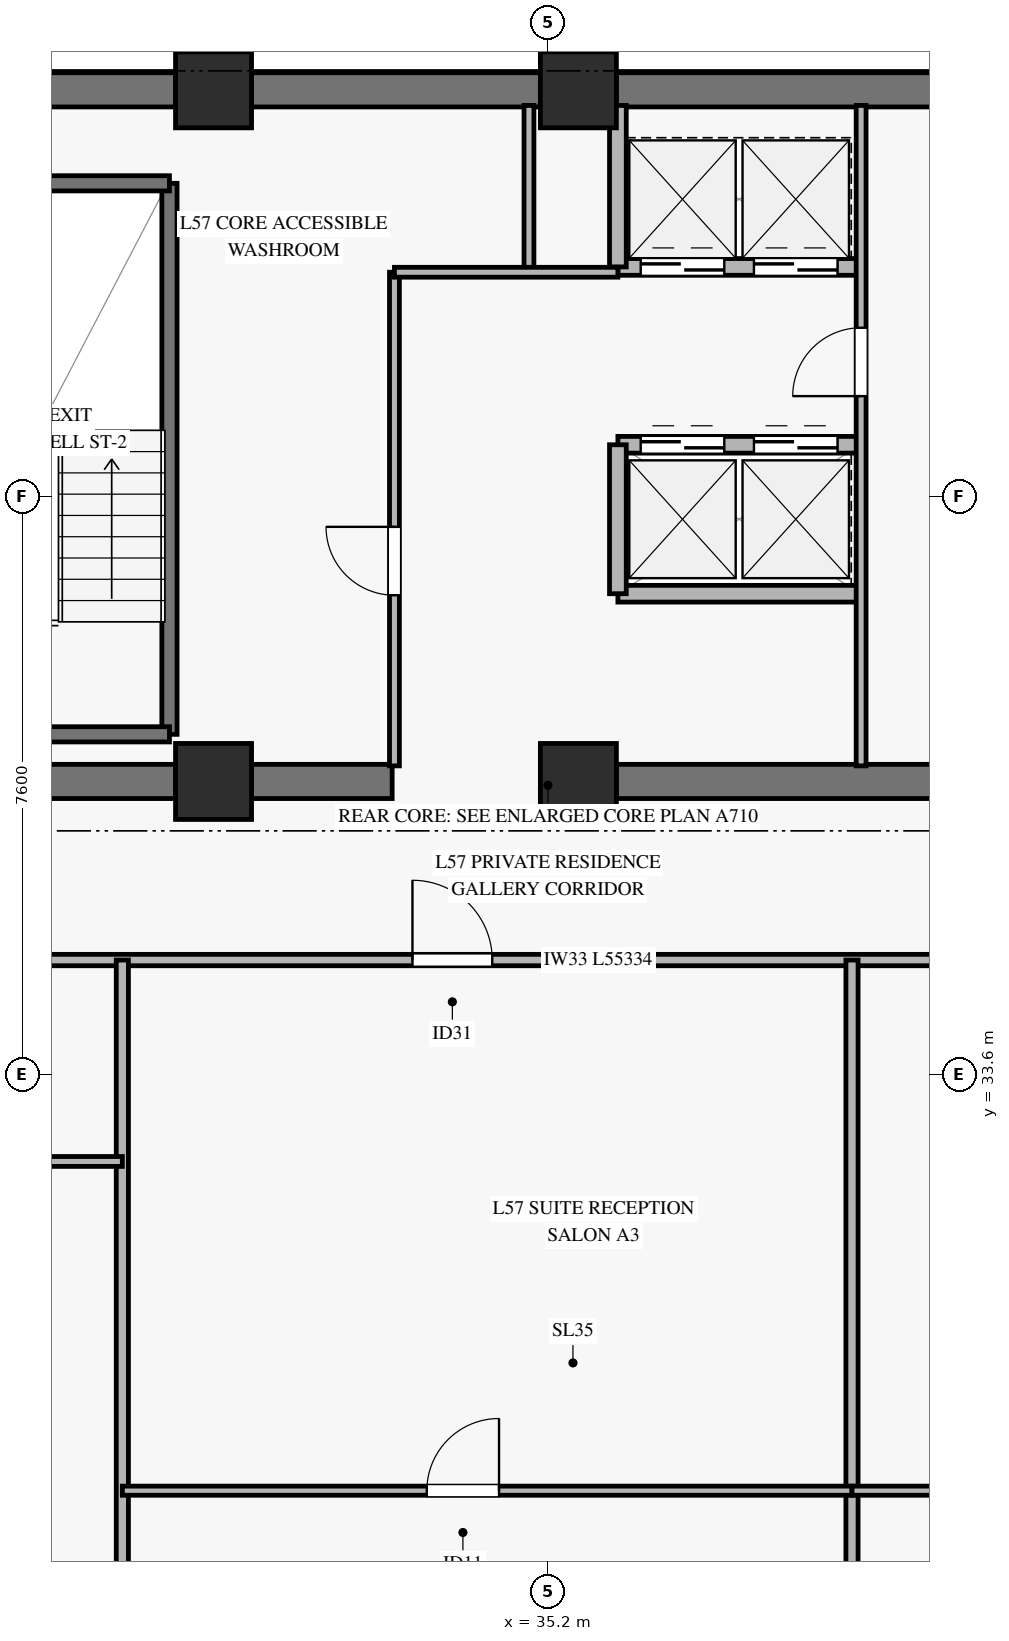
"""IFC4 building model, lengths in metres.
Left out: names, types, materials, properties, quantities, classifications, styles, units other than length and angle.
Written with IfcOpenShell. Run it as: python <this file> out.ifc"""

import sys

from ifc_helpers import new_model, si_unit, direction, frame, frame_2d, origin, origin_2d, place, context, subcontext, project, spatial, rectangle, extrude, source, transform, mapped, element, fill, save


model = new_model("IFC4")
c1 = context("Model", 3, precision=1e-05, world=origin(), true_north=direction((0.0, 1.0)))
c2 = subcontext(c1, "Body", "Model", "MODEL_VIEW")
j1 = project(units=[si_unit("LENGTHUNIT", "METRE"), si_unit("PLANEANGLEUNIT", "RADIAN")], contexts=[c1])
p1 = place(None, origin())
s1 = spatial("IfcSite", under=j1, at=p1, CompositionType="ELEMENT")
p2 = place(p1, origin())
s2 = spatial("IfcBuilding", under=s1, at=p2, CompositionType="ELEMENT")
p3 = place(p2, frame((0.0, 0.0, 227.0)))
s3 = spatial("IfcBuildingStorey", under=s2, at=p3, CompositionType="ELEMENT", Elevation=227.0)
m1 = source(origin(), c2, "Body", "SweptSolid", [
    extrude(rectangle(XDim=1.0, YDim=1.0, at=origin_2d()), origin(), (0.0, 0.0, 1.0), 3.185),
])
for number, where, z_axis, x_axis in (
    (1, (30.8, 37.45, 0.0), (0.0, 0.0, 1.0), (1.0, 0.0, 0.0)),
    (2, (30.8, 46.55, 0.0), (0.0, 0.0, 1.0), (1.0, 0.0, 0.0)),
    (3, (35.6, 37.45, 0.0), (0.0, 0.0, 1.0), (1.0, 0.0, 0.0)),
    (4, (35.6, 46.55, 0.0), (0.0, 0.0, 1.0), (1.0, 0.0, 0.0)),
):
    element("IfcColumn", number, at=place(p3, frame(where, z_axis=z_axis, x_axis=x_axis)), inside=s3, PredefinedType="PILASTER", context=c2, shape_type="MappedRepresentation", body=[
        mapped(m1, transform((0.0, 0.0, 0.0), x_axis=(1.0, 0.0, 0.0), y_axis=(0.0, 1.0, 0.0), z_axis=(0.0, 0.0, 1.0), scale=1.0)),
    ])
p4 = place(p3, frame((20.35, 46.55, 0.0), z_axis=(0.0, 0.0, 1.0), x_axis=(1.0, 0.0, 0.0)))
e5 = element("IfcWall", 5, at=p4, inside=s3, PredefinedType="SHEAR", context=c2, shape_type="SweptSolid", body=[
    extrude(rectangle(XDim=9.95, YDim=0.45, at=frame_2d((4.975, 0.0))), origin(), (0.0, 0.0, 1.0), 3.185),
])
p5 = place(p3, frame((31.3, 46.55, 0.0), z_axis=(0.0, 0.0, 1.0), x_axis=(1.0, 0.0, 0.0)))
e6 = element("IfcWall", 6, at=p5, inside=s3, PredefinedType="SHEAR", context=c2, shape_type="SweptSolid", body=[
    extrude(rectangle(XDim=3.8, YDim=0.45, at=frame_2d((1.9, 0.0))), origin(), (0.0, 0.0, 1.0), 3.185),
])
p6 = place(p3, frame((36.1, 46.55, 0.0), z_axis=(0.0, 0.0, 1.0), x_axis=(1.0, 0.0, 0.0)))
e7 = element("IfcWall", 7, at=p6, inside=s3, PredefinedType="SHEAR", context=c2, shape_type="SweptSolid", body=[
    extrude(rectangle(XDim=7.7, YDim=0.45, at=frame_2d((3.85, 0.0))), origin(), (0.0, 0.0, 1.0), 3.185),
])
p7 = place(p3, frame((20.35, 37.45, 0.0), z_axis=(0.0, 0.0, 1.0), x_axis=(1.0, 0.0, 0.0)))
e8 = element("IfcWall", 8, at=p7, inside=s3, PredefinedType="SHEAR", context=c2, shape_type="SweptSolid", body=[
    extrude(rectangle(XDim=9.95, YDim=0.45, at=frame_2d((4.975, 0.0))), origin(), (0.0, 0.0, 1.0), 3.185),
])
p8 = place(p7, frame((4.2, 0.0, 0.0)))
e9 = element("IfcOpeningElement", 9, at=p8, cuts=e8, PredefinedType="OPENING", context=c2, shape_type="SweptSolid", body=[
    extrude(rectangle(XDim=1.2, YDim=2.15, at=frame_2d((0.6, 1.075))), frame((0.0, 0.235, 0.0), z_axis=(0.0, -1.0, 0.0), x_axis=(1.0, 0.0, 0.0)), (0.0, 0.0, 1.0), 0.47),
])
p9 = place(p3, frame((31.3, 37.45, 0.0), z_axis=(0.0, 0.0, 1.0), x_axis=(1.0, 0.0, 0.0)))
e10 = element("IfcWall", 10, at=p9, inside=s3, PredefinedType="SHEAR", context=c2, shape_type="SweptSolid", body=[
    extrude(rectangle(XDim=1.85, YDim=0.45, at=frame_2d((0.925, 0.0))), origin(), (0.0, 0.0, 1.0), 3.185),
])
p10 = place(p3, frame((36.1, 37.45, 0.0), z_axis=(0.0, 0.0, 1.0), x_axis=(1.0, 0.0, 0.0)))
e11 = element("IfcWall", 11, at=p10, inside=s3, PredefinedType="SHEAR", context=c2, shape_type="SweptSolid", body=[
    extrude(rectangle(XDim=7.7, YDim=0.45, at=frame_2d((3.85, 0.0))), origin(), (0.0, 0.0, 1.0), 3.185),
])
p11 = place(p3, frame((30.22, 38.07, 0.0), z_axis=(0.0, 0.0, 1.0), x_axis=(0.0, 1.0, 0.0)))
e12 = element("IfcWall", 12, at=p11, inside=s3, PredefinedType="SOLIDWALL", context=c2, shape_type="SweptSolid", body=[
    extrude(rectangle(XDim=7.25, YDim=0.2, at=frame_2d((3.625, 0.0))), origin(), (0.0, 0.0, 1.0), 3.4),
])
for number, where, z_axis, x_axis in (
    (13, (27.14, 45.32, 0.0), (0.0, 0.0, 1.0), (1.0, 0.0, 0.0)),
    (14, (27.14, 38.07, 0.0), (0.0, 0.0, 1.0), (1.0, 0.0, 0.0)),
):
    element("IfcWall", number, at=place(p3, frame(where, z_axis=z_axis, x_axis=x_axis)), inside=s3, PredefinedType="SOLIDWALL", context=c2, shape_type="SweptSolid", body=[
        extrude(rectangle(XDim=3.08, YDim=0.2, at=frame_2d((1.54, 0.0))), origin(), (0.0, 0.0, 1.0), 3.4),
    ])
p12 = place(p3, frame((36.12, 44.22, 0.0), z_axis=(0.0, 0.0, 1.0), x_axis=(1.0, 0.0, 0.0)))
e15 = element("IfcWall", 15, at=p12, inside=s3, PredefinedType="SOLIDWALL", context=c2, shape_type="SweptSolid", body=[
    extrude(rectangle(XDim=3.2, YDim=0.22, at=frame_2d((1.6, 0.0))), origin(), (0.0, 0.0, 1.0), 3.185),
])
p13 = place(p12, frame((0.3, 0.0, 0.0)))
e16 = element("IfcOpeningElement", 16, at=p13, cuts=e15, PredefinedType="OPENING", context=c2, shape_type="SweptSolid", body=[
    extrude(rectangle(XDim=1.1, YDim=2.2, at=frame_2d((0.55, 1.1))), frame((0.0, 0.12, 0.0), z_axis=(0.0, -1.0, 0.0), x_axis=(1.0, 0.0, 0.0)), (0.0, 0.0, 1.0), 0.24),
])
p14 = place(p12, frame((1.79, 0.0, 0.0)))
e17 = element("IfcOpeningElement", 17, at=p14, cuts=e15, PredefinedType="OPENING", context=c2, shape_type="SweptSolid", body=[
    extrude(rectangle(XDim=1.1, YDim=2.2, at=frame_2d((0.55, 1.1))), frame((0.0, 0.12, 0.0), z_axis=(0.0, -1.0, 0.0), x_axis=(1.0, 0.0, 0.0)), (0.0, 0.0, 1.0), 0.24),
])
p15 = place(p3, frame((36.12, 41.88, 0.0), z_axis=(0.0, 0.0, 1.0), x_axis=(1.0, 0.0, 0.0)))
e18 = element("IfcWall", 18, at=p15, inside=s3, PredefinedType="SOLIDWALL", context=c2, shape_type="SweptSolid", body=[
    extrude(rectangle(XDim=3.2, YDim=0.22, at=frame_2d((1.6, 0.0))), origin(), (0.0, 0.0, 1.0), 3.185),
])
p16 = place(p15, frame((0.3, 0.0, 0.0)))
e19 = element("IfcOpeningElement", 19, at=p16, cuts=e18, PredefinedType="OPENING", context=c2, shape_type="SweptSolid", body=[
    extrude(rectangle(XDim=1.1, YDim=2.2, at=frame_2d((0.55, 1.1))), frame((0.0, 0.12, 0.0), z_axis=(0.0, -1.0, 0.0), x_axis=(1.0, 0.0, 0.0)), (0.0, 0.0, 1.0), 0.24),
])
p17 = place(p15, frame((1.79, 0.0, 0.0)))
e20 = element("IfcOpeningElement", 20, at=p17, cuts=e18, PredefinedType="OPENING", context=c2, shape_type="SweptSolid", body=[
    extrude(rectangle(XDim=1.1, YDim=2.2, at=frame_2d((0.55, 1.1))), frame((0.0, 0.12, 0.0), z_axis=(0.0, -1.0, 0.0), x_axis=(1.0, 0.0, 0.0)), (0.0, 0.0, 1.0), 0.24),
])
p18 = place(p3, frame((36.12, 39.92, 0.0), z_axis=(0.0, 0.0, 1.0), x_axis=(1.0, 0.0, 0.0)))
e21 = element("IfcWall", 21, at=p18, inside=s3, PredefinedType="SOLIDWALL", context=c2, shape_type="SweptSolid", body=[
    extrude(rectangle(XDim=3.2, YDim=0.22, at=frame_2d((1.6, 0.0))), origin(), (0.0, 0.0, 1.0), 3.185),
])
p19 = place(p3, frame((36.12, 39.92, 0.0), z_axis=(0.0, 0.0, 1.0), x_axis=(0.0, 1.0, 0.0)))
e22 = element("IfcWall", 22, at=p19, inside=s3, PredefinedType="SOLIDWALL", context=c2, shape_type="SweptSolid", body=[
    extrude(rectangle(XDim=1.96, YDim=0.22, at=frame_2d((0.98, 0.0))), origin(), (0.0, 0.0, 1.0), 3.185),
])
p20 = place(p3, frame((36.12, 44.22, 0.0), z_axis=(0.0, 0.0, 1.0), x_axis=(0.0, 1.0, 0.0)))
e23 = element("IfcWall", 23, at=p20, inside=s3, PredefinedType="SOLIDWALL", context=c2, shape_type="SweptSolid", body=[
    extrude(rectangle(XDim=2.125, YDim=0.22, at=frame_2d((1.062, 0.0))), origin(), (0.0, 0.0, 1.0), 3.185),
])
p21 = place(p3, frame((33.18, 37.655, 0.0), z_axis=(0.0, 0.0, 1.0), x_axis=(0.0, 1.0, 0.0)))
e24 = element("IfcWall", 24, at=p21, inside=s3, PredefinedType="PARTITIONING", context=c2, shape_type="SweptSolid", body=[
    extrude(rectangle(XDim=6.495, YDim=0.13, at=frame_2d((3.248, 0.0))), origin(), (0.0, 0.0, 1.0), 2.27),
])
p22 = place(p21, frame((2.245, 0.0, 0.0)))
e25 = element("IfcOpeningElement", 25, at=p22, cuts=e24, PredefinedType="OPENING", context=c2, shape_type="SweptSolid", body=[
    extrude(rectangle(XDim=0.9, YDim=2.1, at=frame_2d((0.45, 1.05))), frame((0.0, 0.075, 0.0), z_axis=(0.0, -1.0, 0.0), x_axis=(1.0, 0.0, 0.0)), (0.0, 0.0, 1.0), 0.15),
])
p23 = place(p3, frame((34.95, 44.15, 0.0), z_axis=(0.0, 0.0, 1.0), x_axis=(0.0, 1.0, 0.0)))
e26 = element("IfcWall", 26, at=p23, inside=s3, PredefinedType="PARTITIONING", context=c2, shape_type="SweptSolid", body=[
    extrude(rectangle(XDim=2.195, YDim=0.13, at=frame_2d((1.098, 0.0))), origin(), (0.0, 0.0, 1.0), 3.185),
])
p24 = place(p3, frame((33.18, 44.15, 0.0), z_axis=(0.0, 0.0, 1.0), x_axis=(1.0, 0.0, 0.0)))
e27 = element("IfcWall", 27, at=p24, inside=s3, PredefinedType="PARTITIONING", context=c2, shape_type="SweptSolid", body=[
    extrude(rectangle(XDim=2.94, YDim=0.13, at=frame_2d((1.47, 0.0))), origin(), (0.0, 0.0, 1.0), 2.47),
])
p25 = place(p3, frame((39.32, 37.655, 0.0), z_axis=(0.0, 0.0, 1.0), x_axis=(0.0, 1.0, 0.0)))
e28 = element("IfcWall", 28, at=p25, inside=s3, PredefinedType="PARTITIONING", context=c2, shape_type="SweptSolid", body=[
    extrude(rectangle(XDim=8.69, YDim=0.13, at=frame_2d((4.345, 0.0))), origin(), (0.0, 0.0, 1.0), 3.185),
])
p26 = place(p25, frame((4.865, 0.0, 0.0)))
e29 = element("IfcOpeningElement", 29, at=p26, cuts=e28, PredefinedType="OPENING", context=c2, shape_type="SweptSolid", body=[
    extrude(rectangle(XDim=0.9, YDim=2.1, at=frame_2d((0.45, 1.05))), frame((0.0, 0.075, 0.0), z_axis=(0.0, -1.0, 0.0), x_axis=(1.0, 0.0, 0.0)), (0.0, 0.0, 1.0), 0.15),
])
p27 = place(p3, frame((7.533, 35.1, 0.0), z_axis=(0.0, 0.0, 1.0), x_axis=(1.0, 0.0, 0.0)))
e30 = element("IfcWall", 30, at=p27, inside=s3, PredefinedType="PARTITIONING", context=c2, shape_type="SweptSolid", body=[
    extrude(rectangle(XDim=55.334, YDim=0.15, at=frame_2d((27.667, 0.0))), origin(), (0.0, 0.0, 1.0), 2.37),
])
p28 = place(p27, frame((5.335, 0.0, 0.0)))
e31 = element("IfcOpeningElement", 31, at=p28, cuts=e30, PredefinedType="OPENING", context=c2, shape_type="SweptSolid", body=[
    extrude(rectangle(XDim=1.05, YDim=2.15, at=frame_2d((0.525, 1.075))), frame((0.0, 0.085, 0.0), z_axis=(0.0, -1.0, 0.0), x_axis=(1.0, 0.0, 0.0)), (0.0, 0.0, 1.0), 0.17),
])
p29 = place(p27, frame((17.207, 0.0, 0.0)))
e32 = element("IfcOpeningElement", 32, at=p29, cuts=e30, PredefinedType="OPENING", context=c2, shape_type="SweptSolid", body=[
    extrude(rectangle(XDim=1.05, YDim=2.15, at=frame_2d((0.525, 1.075))), frame((0.0, 0.085, 0.0), z_axis=(0.0, -1.0, 0.0), x_axis=(1.0, 0.0, 0.0)), (0.0, 0.0, 1.0), 0.17),
])
p30 = place(p27, frame((25.884, 0.0, 0.0)))
e33 = element("IfcOpeningElement", 33, at=p30, cuts=e30, PredefinedType="OPENING", context=c2, shape_type="SweptSolid", body=[
    extrude(rectangle(XDim=1.05, YDim=2.15, at=frame_2d((0.525, 1.075))), frame((0.0, 0.085, 0.0), z_axis=(0.0, -1.0, 0.0), x_axis=(1.0, 0.0, 0.0)), (0.0, 0.0, 1.0), 0.17),
])
p31 = place(p27, frame((35.712, 0.0, 0.0)))
e34 = element("IfcOpeningElement", 34, at=p31, cuts=e30, PredefinedType="OPENING", context=c2, shape_type="SweptSolid", body=[
    extrude(rectangle(XDim=1.05, YDim=2.15, at=frame_2d((0.525, 1.075))), frame((0.0, 0.085, 0.0), z_axis=(0.0, -1.0, 0.0), x_axis=(1.0, 0.0, 0.0)), (0.0, 0.0, 1.0), 0.17),
])
p32 = place(p27, frame((47.078, 0.0, 0.0)))
e35 = element("IfcOpeningElement", 35, at=p32, cuts=e30, PredefinedType="OPENING", context=c2, shape_type="SweptSolid", body=[
    extrude(rectangle(XDim=1.05, YDim=2.15, at=frame_2d((0.525, 1.075))), frame((0.0, 0.085, 0.0), z_axis=(0.0, -1.0, 0.0), x_axis=(1.0, 0.0, 0.0)), (0.0, 0.0, 1.0), 0.17),
])
for number, where, z_axis, x_axis in (
    (36, (29.6, 13.25, 0.0), (0.0, 0.0, 1.0), (0.0, 1.0, 0.0)),
    (37, (39.2, 13.25, 0.0), (0.0, 0.0, 1.0), (0.0, 1.0, 0.0)),
):
    element("IfcWall", number, at=place(p3, frame(where, z_axis=z_axis, x_axis=x_axis)), inside=s3, PredefinedType="PARTITIONING", context=c2, shape_type="SweptSolid", body=[
        extrude(rectangle(XDim=21.85, YDim=0.16, at=frame_2d((10.925, 0.0))), origin(), (0.0, 0.0, 1.0), 2.77),
    ])
p33 = place(p3, frame((27.36, 32.45, 0.0), z_axis=(0.0, 0.0, 1.0), x_axis=(1.0, 0.0, 0.0)))
e38 = element("IfcWall", 38, at=p33, inside=s3, PredefinedType="PARTITIONING", context=c2, shape_type="SweptSolid", body=[
    extrude(rectangle(XDim=2.24, YDim=0.13, at=frame_2d((1.12, 0.0))), origin(), (0.0, 0.0, 1.0), 2.77),
])
p34 = place(p3, frame((29.6, 28.118, 0.0), z_axis=(0.0, 0.0, 1.0), x_axis=(1.0, 0.0, 0.0)))
e39 = element("IfcWall", 39, at=p34, inside=s3, PredefinedType="PARTITIONING", context=c2, shape_type="SweptSolid", body=[
    extrude(rectangle(XDim=9.6, YDim=0.12, at=frame_2d((4.8, 0.0))), origin(), (0.0, 0.0, 1.0), 2.37),
])
p35 = place(p34, frame((4.006, 0.0, 0.0)))
e40 = element("IfcOpeningElement", 40, at=p35, cuts=e39, PredefinedType="OPENING", context=c2, shape_type="SweptSolid", body=[
    extrude(rectangle(XDim=0.95, YDim=2.1, at=frame_2d((0.475, 1.05))), frame((0.0, 0.07, 0.0), z_axis=(0.0, -1.0, 0.0), x_axis=(1.0, 0.0, 0.0)), (0.0, 0.0, 1.0), 0.14),
])
p36 = place(p3, frame((39.2, 28.118, 0.0), z_axis=(0.0, 0.0, 1.0), x_axis=(1.0, 0.0, 0.0)))
e41 = element("IfcWall", 41, at=p36, inside=s3, PredefinedType="PARTITIONING", context=c2, shape_type="SweptSolid", body=[
    extrude(rectangle(XDim=10.2, YDim=0.12, at=frame_2d((5.1, 0.0))), origin(), (0.0, 0.0, 1.0), 2.37),
])
p37 = place(p36, frame((4.246, 0.0, 0.0)))
e42 = element("IfcOpeningElement", 42, at=p37, cuts=e41, PredefinedType="OPENING", context=c2, shape_type="SweptSolid", body=[
    extrude(rectangle(XDim=0.95, YDim=2.1, at=frame_2d((0.475, 1.05))), frame((0.0, 0.07, 0.0), z_axis=(0.0, -1.0, 0.0), x_axis=(1.0, 0.0, 0.0)), (0.0, 0.0, 1.0), 0.14),
])
m2 = source(origin(), c2, "Body", "SweptSolid", [
    extrude(rectangle(XDim=1.1, YDim=2.2, at=frame_2d((0.55, 1.1))), frame((0.0, 0.025, 0.0), z_axis=(0.0, -1.0, 0.0), x_axis=(1.0, 0.0, 0.0)), (0.0, 0.0, 1.0), 0.05),
])
p38 = place(p13, origin())
e43 = element("IfcDoor", 43, at=p38, inside=s3, OperationType="SLIDING_TO_LEFT", PredefinedType="DOOR", context=c2, shape_type="MappedRepresentation", body=[
    mapped(m2, transform((0.0, 0.0, 0.0), x_axis=(1.0, 0.0, 0.0), y_axis=(0.0, 1.0, 0.0), z_axis=(0.0, 0.0, 1.0), scale=1.0)),
])
fill(e16, e43)
p39 = place(p14, origin())
e44 = element("IfcDoor", 44, at=p39, inside=s3, OperationType="SLIDING_TO_LEFT", PredefinedType="DOOR", context=c2, shape_type="MappedRepresentation", body=[
    mapped(m2, transform((0.0, 0.0, 0.0), x_axis=(1.0, 0.0, 0.0), y_axis=(0.0, 1.0, 0.0), z_axis=(0.0, 0.0, 1.0), scale=1.0)),
])
fill(e17, e44)
p40 = place(p16, origin())
e45 = element("IfcDoor", 45, at=p40, inside=s3, OperationType="SLIDING_TO_LEFT", PredefinedType="DOOR", context=c2, shape_type="MappedRepresentation", body=[
    mapped(m2, transform((0.0, 0.0, 0.0), x_axis=(1.0, 0.0, 0.0), y_axis=(0.0, 1.0, 0.0), z_axis=(0.0, 0.0, 1.0), scale=1.0)),
])
fill(e19, e45)
p41 = place(p17, origin())
e46 = element("IfcDoor", 46, at=p41, inside=s3, OperationType="SLIDING_TO_LEFT", PredefinedType="DOOR", context=c2, shape_type="MappedRepresentation", body=[
    mapped(m2, transform((0.0, 0.0, 0.0), x_axis=(1.0, 0.0, 0.0), y_axis=(0.0, 1.0, 0.0), z_axis=(0.0, 0.0, 1.0), scale=1.0)),
])
fill(e20, e46)
m3 = source(origin(), c2, "Body", "SweptSolid", [
    extrude(rectangle(XDim=0.9, YDim=2.1, at=frame_2d((0.45, 1.05))), frame((0.0, 0.025, 0.0), z_axis=(0.0, -1.0, 0.0), x_axis=(1.0, 0.0, 0.0)), (0.0, 0.0, 1.0), 0.05),
])
p42 = place(p22, origin())
e47 = element("IfcDoor", 47, at=p42, inside=s3, OperationType="SINGLE_SWING_RIGHT", PredefinedType="DOOR", context=c2, shape_type="MappedRepresentation", body=[
    mapped(m3, transform((0.0, 0.0, 0.0), x_axis=(1.0, 0.0, 0.0), y_axis=(0.0, 1.0, 0.0), z_axis=(0.0, 0.0, 1.0), scale=1.0)),
])
fill(e25, e47)
p43 = place(p26, origin())
e48 = element("IfcDoor", 48, at=p43, inside=s3, OperationType="SINGLE_SWING_LEFT", PredefinedType="DOOR", context=c2, shape_type="MappedRepresentation", body=[
    mapped(m3, transform((0.0, 0.0, 0.0), x_axis=(1.0, 0.0, 0.0), y_axis=(0.0, 1.0, 0.0), z_axis=(0.0, 0.0, 1.0), scale=1.0)),
])
fill(e29, e48)
m4 = source(origin(), c2, "Body", "SweptSolid", [
    extrude(rectangle(XDim=1.05, YDim=2.15, at=frame_2d((0.525, 1.075))), frame((0.0, 0.025, 0.0), z_axis=(0.0, -1.0, 0.0), x_axis=(1.0, 0.0, 0.0)), (0.0, 0.0, 1.0), 0.05),
])
p44 = place(p30, origin())
e49 = element("IfcDoor", 49, at=p44, inside=s3, OperationType="SINGLE_SWING_LEFT", PredefinedType="DOOR", context=c2, shape_type="MappedRepresentation", body=[
    mapped(m4, transform((0.0, 0.0, 0.0), x_axis=(1.0, 0.0, 0.0), y_axis=(0.0, 1.0, 0.0), z_axis=(0.0, 0.0, 1.0), scale=1.0)),
])
fill(e33, e49)
m5 = source(origin(), c2, "Body", "SweptSolid", [
    extrude(rectangle(XDim=0.95, YDim=2.1, at=frame_2d((0.475, 1.05))), frame((0.0, 0.025, 0.0), z_axis=(0.0, -1.0, 0.0), x_axis=(1.0, 0.0, 0.0)), (0.0, 0.0, 1.0), 0.05),
])
p45 = place(p35, origin())
e50 = element("IfcDoor", 50, at=p45, inside=s3, OperationType="SINGLE_SWING_RIGHT", PredefinedType="DOOR", context=c2, shape_type="MappedRepresentation", body=[
    mapped(m5, transform((0.0, 0.0, 0.0), x_axis=(1.0, 0.0, 0.0), y_axis=(0.0, 1.0, 0.0), z_axis=(0.0, 0.0, 1.0), scale=1.0)),
])
fill(e40, e50)
save(model, sys.argv[1])
